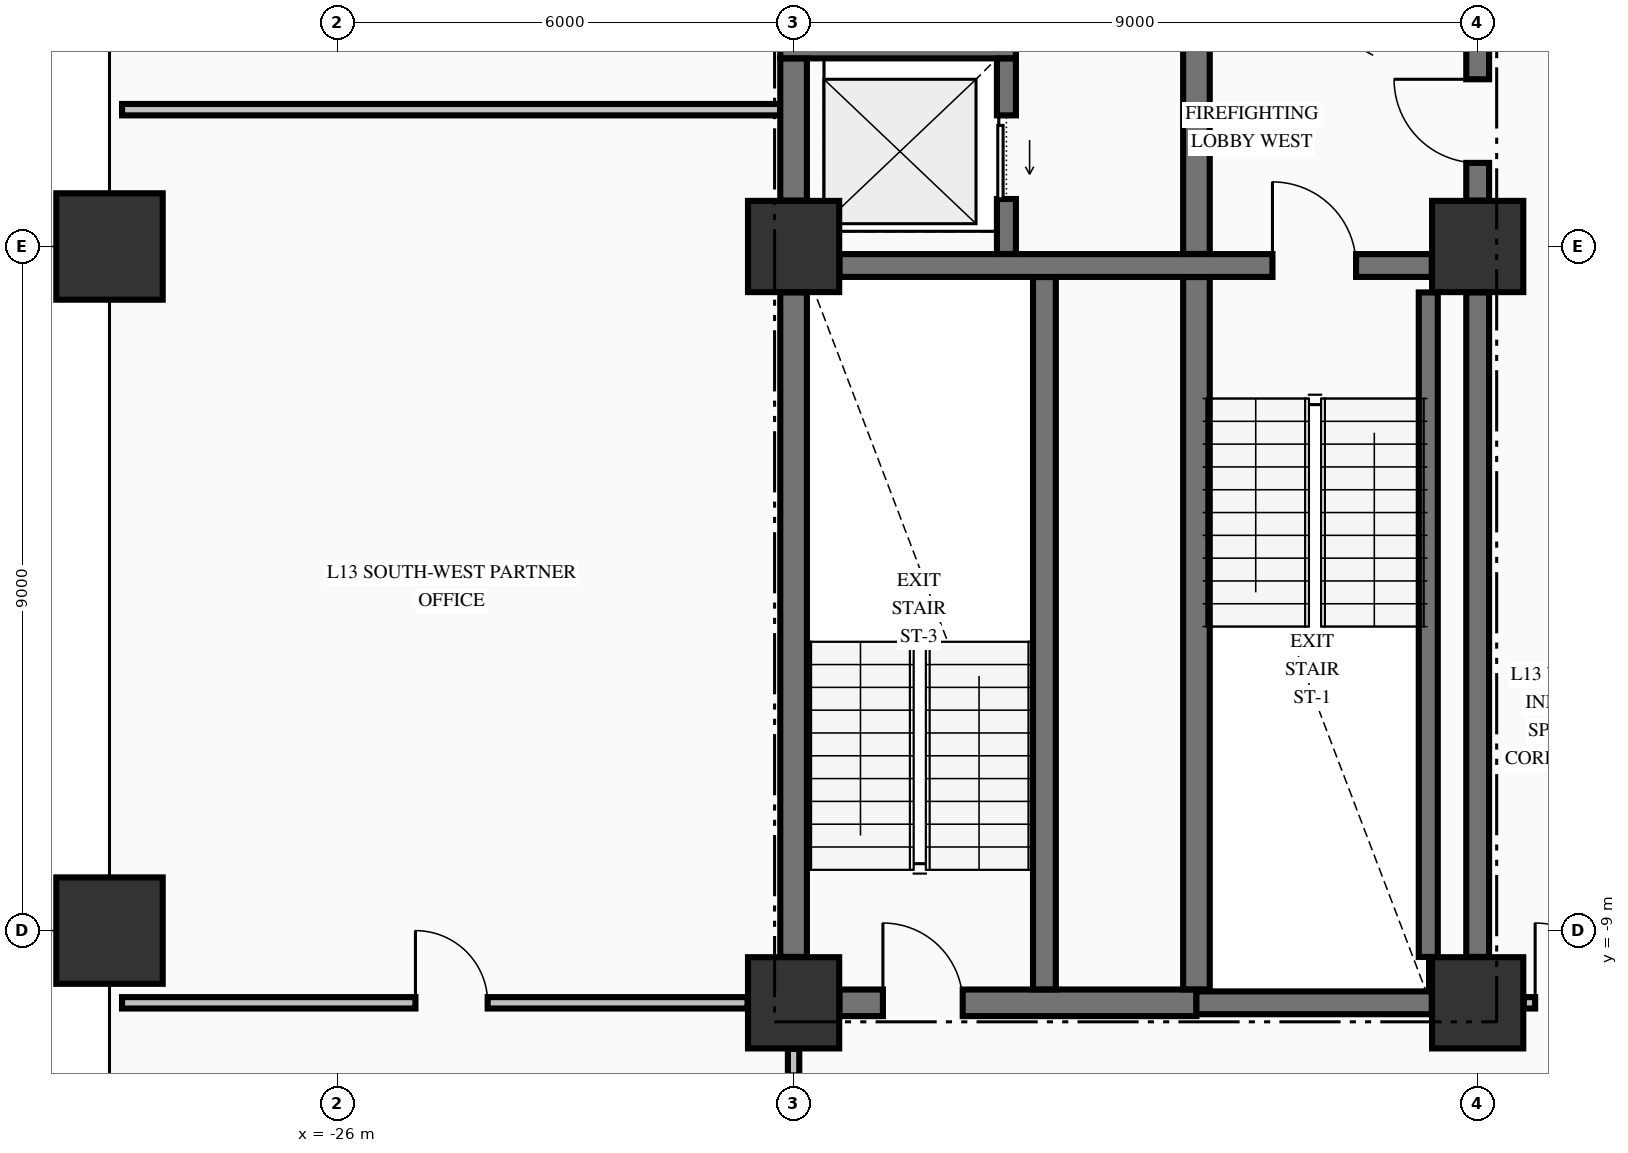
"""IFC4 building model, lengths in metres.
Left out: names, types, materials, properties, quantities, classifications, styles, units other than length and angle.
Written with IfcOpenShell. Run it as: python <this file> out.ifc"""

import sys

from ifc_helpers import new_model, si_unit, direction, frame, frame_2d, origin, origin_2d, place, context, subcontext, project, spatial, rectangle, extrude, element, fill, save


model = new_model("IFC4")
c1 = context("Model", 3, precision=1e-05, world=origin(), true_north=direction((0.0, 1.0)))
c2 = subcontext(c1, "Body", "Model", "MODEL_VIEW")
j1 = project(units=[si_unit("LENGTHUNIT", "METRE"), si_unit("PLANEANGLEUNIT", "RADIAN")], contexts=[c1])
p1 = place(None, origin())
s1 = spatial("IfcSite", under=j1, at=p1, CompositionType="ELEMENT")
p2 = place(p1, origin())
s2 = spatial("IfcBuilding", under=s1, at=p2, CompositionType="ELEMENT")
p3 = place(p2, frame((0.0, 0.0, 57.19)))
s3 = spatial("IfcBuildingStorey", under=s2, at=p3, CompositionType="ELEMENT", Elevation=57.19)
for number, where, z_axis, x_axis in (
    (1, (-29.0, -9.0, -0.425), (0.0, 0.0, 1.0), (1.0, 0.0, 0.0)),
    (2, (-29.0, 0.0, -0.425), (0.0, 0.0, 1.0), (1.0, 0.0, 0.0)),
):
    element("IfcColumn", number, at=place(p3, frame(where, z_axis=z_axis, x_axis=x_axis)), inside=s3, PredefinedType="COLUMN", context=c2, shape_type="SweptSolid", body=[
        extrude(rectangle(XDim=1.4, YDim=1.4, at=origin_2d()), origin(), (0.0, 0.0, 1.0), 3.695),
    ])
for number, where, z_axis, x_axis in (
    (3, (-20.0, -9.95, -0.425), (0.0, 0.0, 1.0), (1.0, 0.0, 0.0)),
    (4, (-11.0, -9.95, -0.425), (0.0, 0.0, 1.0), (1.0, 0.0, 0.0)),
    (5, (-11.0, 0.0, -0.425), (0.0, 0.0, 1.0), (1.0, 0.0, 0.0)),
    (6, (-20.0, 0.0, -0.425), (0.0, 0.0, 1.0), (1.0, 0.0, 0.0)),
):
    element("IfcColumn", number, at=place(p3, frame(where, z_axis=z_axis, x_axis=x_axis)), inside=s3, PredefinedType="COLUMN", context=c2, shape_type="SweptSolid", body=[
        extrude(rectangle(XDim=1.2, YDim=1.2, at=origin_2d()), origin(), (0.0, 0.0, 1.0), 3.695),
    ])
p4 = place(p3, frame((-19.396, -9.95, 0.0), z_axis=(0.0, 0.0, 1.0), x_axis=(1.0, 0.0, 0.0)))
e7 = element("IfcWall", 7, at=p4, inside=s3, PredefinedType="SHEAR", context=c2, shape_type="SweptSolid", body=[
    extrude(rectangle(XDim=4.696, YDim=0.35, at=frame_2d((2.348, 0.0))), origin(), (0.0, 0.0, 1.0), 3.27),
])
p5 = place(p4, frame((0.571, 0.0, 0.0)))
e8 = element("IfcOpeningElement", 8, at=p5, cuts=e7, PredefinedType="OPENING", context=c2, shape_type="SweptSolid", body=[
    extrude(rectangle(XDim=1.05, YDim=2.15, at=frame_2d((0.525, 1.075))), frame((0.0, 0.185, 0.0), z_axis=(0.0, -1.0, 0.0), x_axis=(1.0, 0.0, 0.0)), (0.0, 0.0, 1.0), 0.37),
])
p6 = place(p3, frame((-14.7, -9.95, 0.0), z_axis=(0.0, 0.0, 1.0), x_axis=(1.0, 0.0, 0.0)))
e9 = element("IfcWall", 9, at=p6, inside=s3, PredefinedType="SHEAR", context=c2, shape_type="SweptSolid", body=[
    extrude(rectangle(XDim=3.096, YDim=0.3, at=frame_2d((1.548, 0.0))), origin(), (0.0, 0.0, 1.0), 3.27),
])
p7 = place(p3, frame((-19.396, -0.25, 0.0), z_axis=(0.0, 0.0, 1.0), x_axis=(1.0, 0.0, 0.0)))
e10 = element("IfcWall", 10, at=p7, inside=s3, PredefinedType="SHEAR", context=c2, shape_type="SweptSolid", body=[
    extrude(rectangle(XDim=7.792, YDim=0.3, at=frame_2d((3.896, 0.0))), origin(), (0.0, 0.0, 1.0), 3.27),
])
p8 = place(p7, frame((5.696, 0.0, 0.0)))
e11 = element("IfcOpeningElement", 11, at=p8, cuts=e10, PredefinedType="OPENING", context=c2, shape_type="SweptSolid", body=[
    extrude(rectangle(XDim=1.1, YDim=2.15, at=frame_2d((0.55, 1.075))), frame((0.0, 0.16, 0.0), z_axis=(0.0, -1.0, 0.0), x_axis=(1.0, 0.0, 0.0)), (0.0, 0.0, 1.0), 0.32),
])
p9 = place(p3, frame((-20.175, 2.6, 0.0), z_axis=(0.0, 0.0, 1.0), x_axis=(1.0, 0.0, 0.0)))
e12 = element("IfcWall", 12, at=p9, inside=s3, PredefinedType="SOLIDWALL", context=c2, shape_type="SweptSolid", body=[
    extrude(rectangle(XDim=3.1, YDim=0.25, at=frame_2d((1.55, 0.0))), origin(), (0.0, 0.0, 1.0), 3.27),
])
p10 = place(p3, frame((-28.835, -9.95, 0.0), z_axis=(0.0, 0.0, 1.0), x_axis=(1.0, 0.0, 0.0)))
e13 = element("IfcWall", 13, at=p10, inside=s3, PredefinedType="PARTITIONING", context=c2, shape_type="SweptSolid", body=[
    extrude(rectangle(XDim=8.229, YDim=0.15, at=frame_2d((4.115, 0.0))), origin(), (0.0, 0.0, 1.0), 3.27),
])
p11 = place(p10, frame((3.86, 0.0, 0.0)))
e14 = element("IfcOpeningElement", 14, at=p11, cuts=e13, PredefinedType="OPENING", context=c2, shape_type="SweptSolid", body=[
    extrude(rectangle(XDim=0.95, YDim=2.15, at=frame_2d((0.475, 1.075))), frame((0.0, 0.085, 0.0), z_axis=(0.0, -1.0, 0.0), x_axis=(1.0, 0.0, 0.0)), (0.0, 0.0, 1.0), 0.17),
])
p12 = place(p3, frame((-10.394, -9.95, 0.0), z_axis=(0.0, 0.0, 1.0), x_axis=(1.0, 0.0, 0.0)))
e15 = element("IfcWall", 15, at=p12, inside=s3, PredefinedType="PARTITIONING", context=c2, shape_type="SweptSolid", body=[
    extrude(rectangle(XDim=20.788, YDim=0.15, at=frame_2d((10.394, 0.0))), origin(), (0.0, 0.0, 1.0), 3.27),
])
p13 = place(p12, frame((0.15, 0.0, 0.0)))
e16 = element("IfcOpeningElement", 16, at=p13, cuts=e15, PredefinedType="OPENING", context=c2, shape_type="SweptSolid", body=[
    extrude(rectangle(XDim=1.05, YDim=2.15, at=frame_2d((0.525, 1.075))), frame((0.0, 0.085, 0.0), z_axis=(0.0, -1.0, 0.0), x_axis=(1.0, 0.0, 0.0)), (0.0, 0.0, 1.0), 0.17),
])
p14 = place(p12, frame((19.588, 0.0, 0.0)))
e17 = element("IfcOpeningElement", 17, at=p14, cuts=e15, PredefinedType="OPENING", context=c2, shape_type="SweptSolid", body=[
    extrude(rectangle(XDim=1.05, YDim=2.15, at=frame_2d((0.525, 1.075))), frame((0.0, 0.085, 0.0), z_axis=(0.0, -1.0, 0.0), x_axis=(1.0, 0.0, 0.0)), (0.0, 0.0, 1.0), 0.17),
])
p15 = place(p12, frame((13.769, 0.0, 0.0)))
e18 = element("IfcOpeningElement", 18, at=p15, cuts=e15, PredefinedType="OPENING", context=c2, shape_type="SweptSolid", body=[
    extrude(rectangle(XDim=0.95, YDim=2.15, at=frame_2d((0.475, 1.075))), frame((0.0, 0.085, 0.0), z_axis=(0.0, -1.0, 0.0), x_axis=(1.0, 0.0, 0.0)), (0.0, 0.0, 1.0), 0.17),
])
p16 = place(p3, frame((-28.835, 1.8, 0.0), z_axis=(0.0, 0.0, 1.0), x_axis=(1.0, 0.0, 0.0)))
e19 = element("IfcWall", 19, at=p16, inside=s3, PredefinedType="PARTITIONING", context=c2, shape_type="SweptSolid", body=[
    extrude(rectangle(XDim=8.657, YDim=0.15, at=frame_2d((4.329, 0.0))), origin(), (0.0, 0.0, 1.0), 3.27),
])
p17 = place(p3, frame((-20.0, -9.346, 0.0), z_axis=(0.0, 0.0, 1.0), x_axis=(0.0, 1.0, 0.0)))
e20 = element("IfcWall", 20, at=p17, inside=s3, PredefinedType="SHEAR", context=c2, shape_type="SweptSolid", body=[
    extrude(rectangle(XDim=8.742, YDim=0.35, at=frame_2d((4.371, 0.0))), origin(), (0.0, 0.0, 1.0), 3.27),
])
p18 = place(p3, frame((-20.0, 0.604, 0.0), z_axis=(0.0, 0.0, 1.0), x_axis=(0.0, 1.0, 0.0)))
e21 = element("IfcWall", 21, at=p18, inside=s3, PredefinedType="SHEAR", context=c2, shape_type="SweptSolid", body=[
    extrude(rectangle(XDim=1.869, YDim=0.35, at=frame_2d((0.935, 0.0))), origin(), (0.0, 0.0, 1.0), 3.27),
])
p19 = place(p3, frame((-17.2, -0.098, 0.0), z_axis=(0.0, 0.0, 1.0), x_axis=(0.0, 1.0, 0.0)))
e22 = element("IfcWall", 22, at=p19, inside=s3, PredefinedType="SOLIDWALL", context=c2, shape_type="SweptSolid", body=[
    extrude(rectangle(XDim=2.571, YDim=0.25, at=frame_2d((1.285, 0.0))), origin(), (0.0, 0.0, 1.0), 3.27),
])
p20 = place(p19, frame((0.723, 0.0, 0.0)))
e23 = element("IfcOpeningElement", 23, at=p20, cuts=e22, PredefinedType="OPENING", context=c2, shape_type="SweptSolid", body=[
    extrude(rectangle(XDim=1.1, YDim=2.2, at=frame_2d((0.55, 1.1))), frame((0.0, 0.135, 0.0), z_axis=(0.0, -1.0, 0.0), x_axis=(1.0, 0.0, 0.0)), (0.0, 0.0, 1.0), 0.27),
])
p21 = place(p3, frame((-16.7, -9.773, 0.0), z_axis=(0.0, 0.0, 1.0), x_axis=(0.0, 1.0, 0.0)))
e24 = element("IfcWall", 24, at=p21, inside=s3, PredefinedType="SHEAR", context=c2, shape_type="SweptSolid", body=[
    extrude(rectangle(XDim=9.371, YDim=0.3, at=frame_2d((4.686, 0.0))), origin(), (0.0, 0.0, 1.0), 3.27),
])
p22 = place(p3, frame((-14.7, -9.773, 0.0), z_axis=(0.0, 0.0, 1.0), x_axis=(0.0, 1.0, 0.0)))
e25 = element("IfcWall", 25, at=p22, inside=s3, PredefinedType="SHEAR", context=c2, shape_type="SweptSolid", body=[
    extrude(rectangle(XDim=9.371, YDim=0.35, at=frame_2d((4.686, 0.0))), origin(), (0.0, 0.0, 1.0), 3.27),
])
p23 = place(p3, frame((-14.7, -0.098, 0.0), z_axis=(0.0, 0.0, 1.0), x_axis=(0.0, 1.0, 0.0)))
e26 = element("IfcWall", 26, at=p23, inside=s3, PredefinedType="SHEAR", context=c2, shape_type="SweptSolid", body=[
    extrude(rectangle(XDim=2.846, YDim=0.35, at=frame_2d((1.423, 0.0))), origin(), (0.0, 0.0, 1.0), 3.27),
])
p24 = place(p3, frame((-11.65, -9.346, 0.0), z_axis=(0.0, 0.0, 1.0), x_axis=(0.0, 1.0, 0.0)))
e27 = element("IfcWall", 27, at=p24, inside=s3, PredefinedType="SOLIDWALL", context=c2, shape_type="SweptSolid", body=[
    extrude(rectangle(XDim=8.742, YDim=0.25, at=frame_2d((4.371, 0.0))), origin(), (0.0, 0.0, 1.0), 3.27),
])
p25 = place(p3, frame((-11.0, -9.346, 0.0), z_axis=(0.0, 0.0, 1.0), x_axis=(0.0, 1.0, 0.0)))
e28 = element("IfcWall", 28, at=p25, inside=s3, PredefinedType="SHEAR", context=c2, shape_type="SweptSolid", body=[
    extrude(rectangle(XDim=8.742, YDim=0.3, at=frame_2d((4.371, 0.0))), origin(), (0.0, 0.0, 1.0), 3.27),
])
p26 = place(p3, frame((-11.0, 0.604, 0.0), z_axis=(0.0, 0.0, 1.0), x_axis=(0.0, 1.0, 0.0)))
e29 = element("IfcWall", 29, at=p26, inside=s3, PredefinedType="SHEAR", context=c2, shape_type="SweptSolid", body=[
    extrude(rectangle(XDim=2.144, YDim=0.3, at=frame_2d((1.072, 0.0))), origin(), (0.0, 0.0, 1.0), 3.27),
])
p27 = place(p26, frame((0.496, 0.0, 0.0)))
e30 = element("IfcOpeningElement", 30, at=p27, cuts=e29, PredefinedType="OPENING", context=c2, shape_type="SweptSolid", body=[
    extrude(rectangle(XDim=1.1, YDim=2.15, at=frame_2d((0.55, 1.075))), frame((0.0, 0.16, 0.0), z_axis=(0.0, -1.0, 0.0), x_axis=(1.0, 0.0, 0.0)), (0.0, 0.0, 1.0), 0.32),
])
p28 = place(p3, frame((-20.0, -12.722, 0.0), z_axis=(0.0, 0.0, 1.0), x_axis=(0.0, 1.0, 0.0)))
e31 = element("IfcWall", 31, at=p28, inside=s3, PredefinedType="PARTITIONING", context=c2, shape_type="SweptSolid", body=[
    extrude(rectangle(XDim=2.166, YDim=0.15, at=frame_2d((1.083, 0.0))), origin(), (0.0, 0.0, 1.0), 2.61),
])
p29 = place(p28, frame((0.867, 0.0, 0.0)))
e32 = element("IfcOpeningElement", 32, at=p29, cuts=e31, PredefinedType="OPENING", context=c2, shape_type="SweptSolid", body=[
    extrude(rectangle(XDim=0.95, YDim=2.15, at=frame_2d((0.475, 1.075))), frame((0.0, 0.085, 0.0), z_axis=(0.0, -1.0, 0.0), x_axis=(1.0, 0.0, 0.0)), (0.0, 0.0, 1.0), 0.17),
])
p30 = place(p8, origin())
e33 = element("IfcDoor", 33, at=p30, inside=s3, OperationType="SINGLE_SWING_LEFT", PredefinedType="DOOR", context=c2, shape_type="SweptSolid", body=[
    extrude(rectangle(XDim=1.1, YDim=2.15, at=frame_2d((0.55, 1.075))), frame((0.0, 0.025, 0.0), z_axis=(0.0, -1.0, 0.0), x_axis=(1.0, 0.0, 0.0)), (0.0, 0.0, 1.0), 0.05),
])
fill(e11, e33)
p31 = place(p27, origin())
e34 = element("IfcDoor", 34, at=p31, inside=s3, OperationType="SINGLE_SWING_RIGHT", PredefinedType="DOOR", context=c2, shape_type="SweptSolid", body=[
    extrude(rectangle(XDim=1.1, YDim=2.15, at=frame_2d((0.55, 1.075))), frame((0.0, 0.025, 0.0), z_axis=(0.0, -1.0, 0.0), x_axis=(1.0, 0.0, 0.0)), (0.0, 0.0, 1.0), 0.05),
])
fill(e30, e34)
p32 = place(p5, origin())
e35 = element("IfcDoor", 35, at=p32, inside=s3, OperationType="SINGLE_SWING_LEFT", PredefinedType="DOOR", context=c2, shape_type="SweptSolid", body=[
    extrude(rectangle(XDim=1.05, YDim=2.15, at=frame_2d((0.525, 1.075))), frame((0.0, 0.025, 0.0), z_axis=(0.0, -1.0, 0.0), x_axis=(1.0, 0.0, 0.0)), (0.0, 0.0, 1.0), 0.05),
])
fill(e8, e35)
p33 = place(p20, origin())
e36 = element("IfcDoor", 36, at=p33, inside=s3, OperationType="SLIDING_TO_LEFT", PredefinedType="DOOR", context=c2, shape_type="SweptSolid", body=[
    extrude(rectangle(XDim=1.1, YDim=2.2, at=frame_2d((0.55, 1.1))), frame((0.0, 0.025, 0.0), z_axis=(0.0, -1.0, 0.0), x_axis=(1.0, 0.0, 0.0)), (0.0, 0.0, 1.0), 0.05),
])
fill(e23, e36)
p34 = place(p13, origin())
e37 = element("IfcDoor", 37, at=p34, inside=s3, OperationType="SINGLE_SWING_LEFT", PredefinedType="DOOR", context=c2, shape_type="SweptSolid", body=[
    extrude(rectangle(XDim=1.05, YDim=2.15, at=frame_2d((0.525, 1.075))), frame((0.0, 0.025, 0.0), z_axis=(0.0, -1.0, 0.0), x_axis=(1.0, 0.0, 0.0)), (0.0, 0.0, 1.0), 0.05),
])
fill(e16, e37)
p35 = place(p11, origin())
e38 = element("IfcDoor", 38, at=p35, inside=s3, OperationType="SINGLE_SWING_LEFT", PredefinedType="DOOR", context=c2, shape_type="SweptSolid", body=[
    extrude(rectangle(XDim=0.95, YDim=2.15, at=frame_2d((0.475, 1.075))), frame((0.0, 0.025, 0.0), z_axis=(0.0, -1.0, 0.0), x_axis=(1.0, 0.0, 0.0)), (0.0, 0.0, 1.0), 0.05),
])
fill(e14, e38)
save(model, sys.argv[1])
